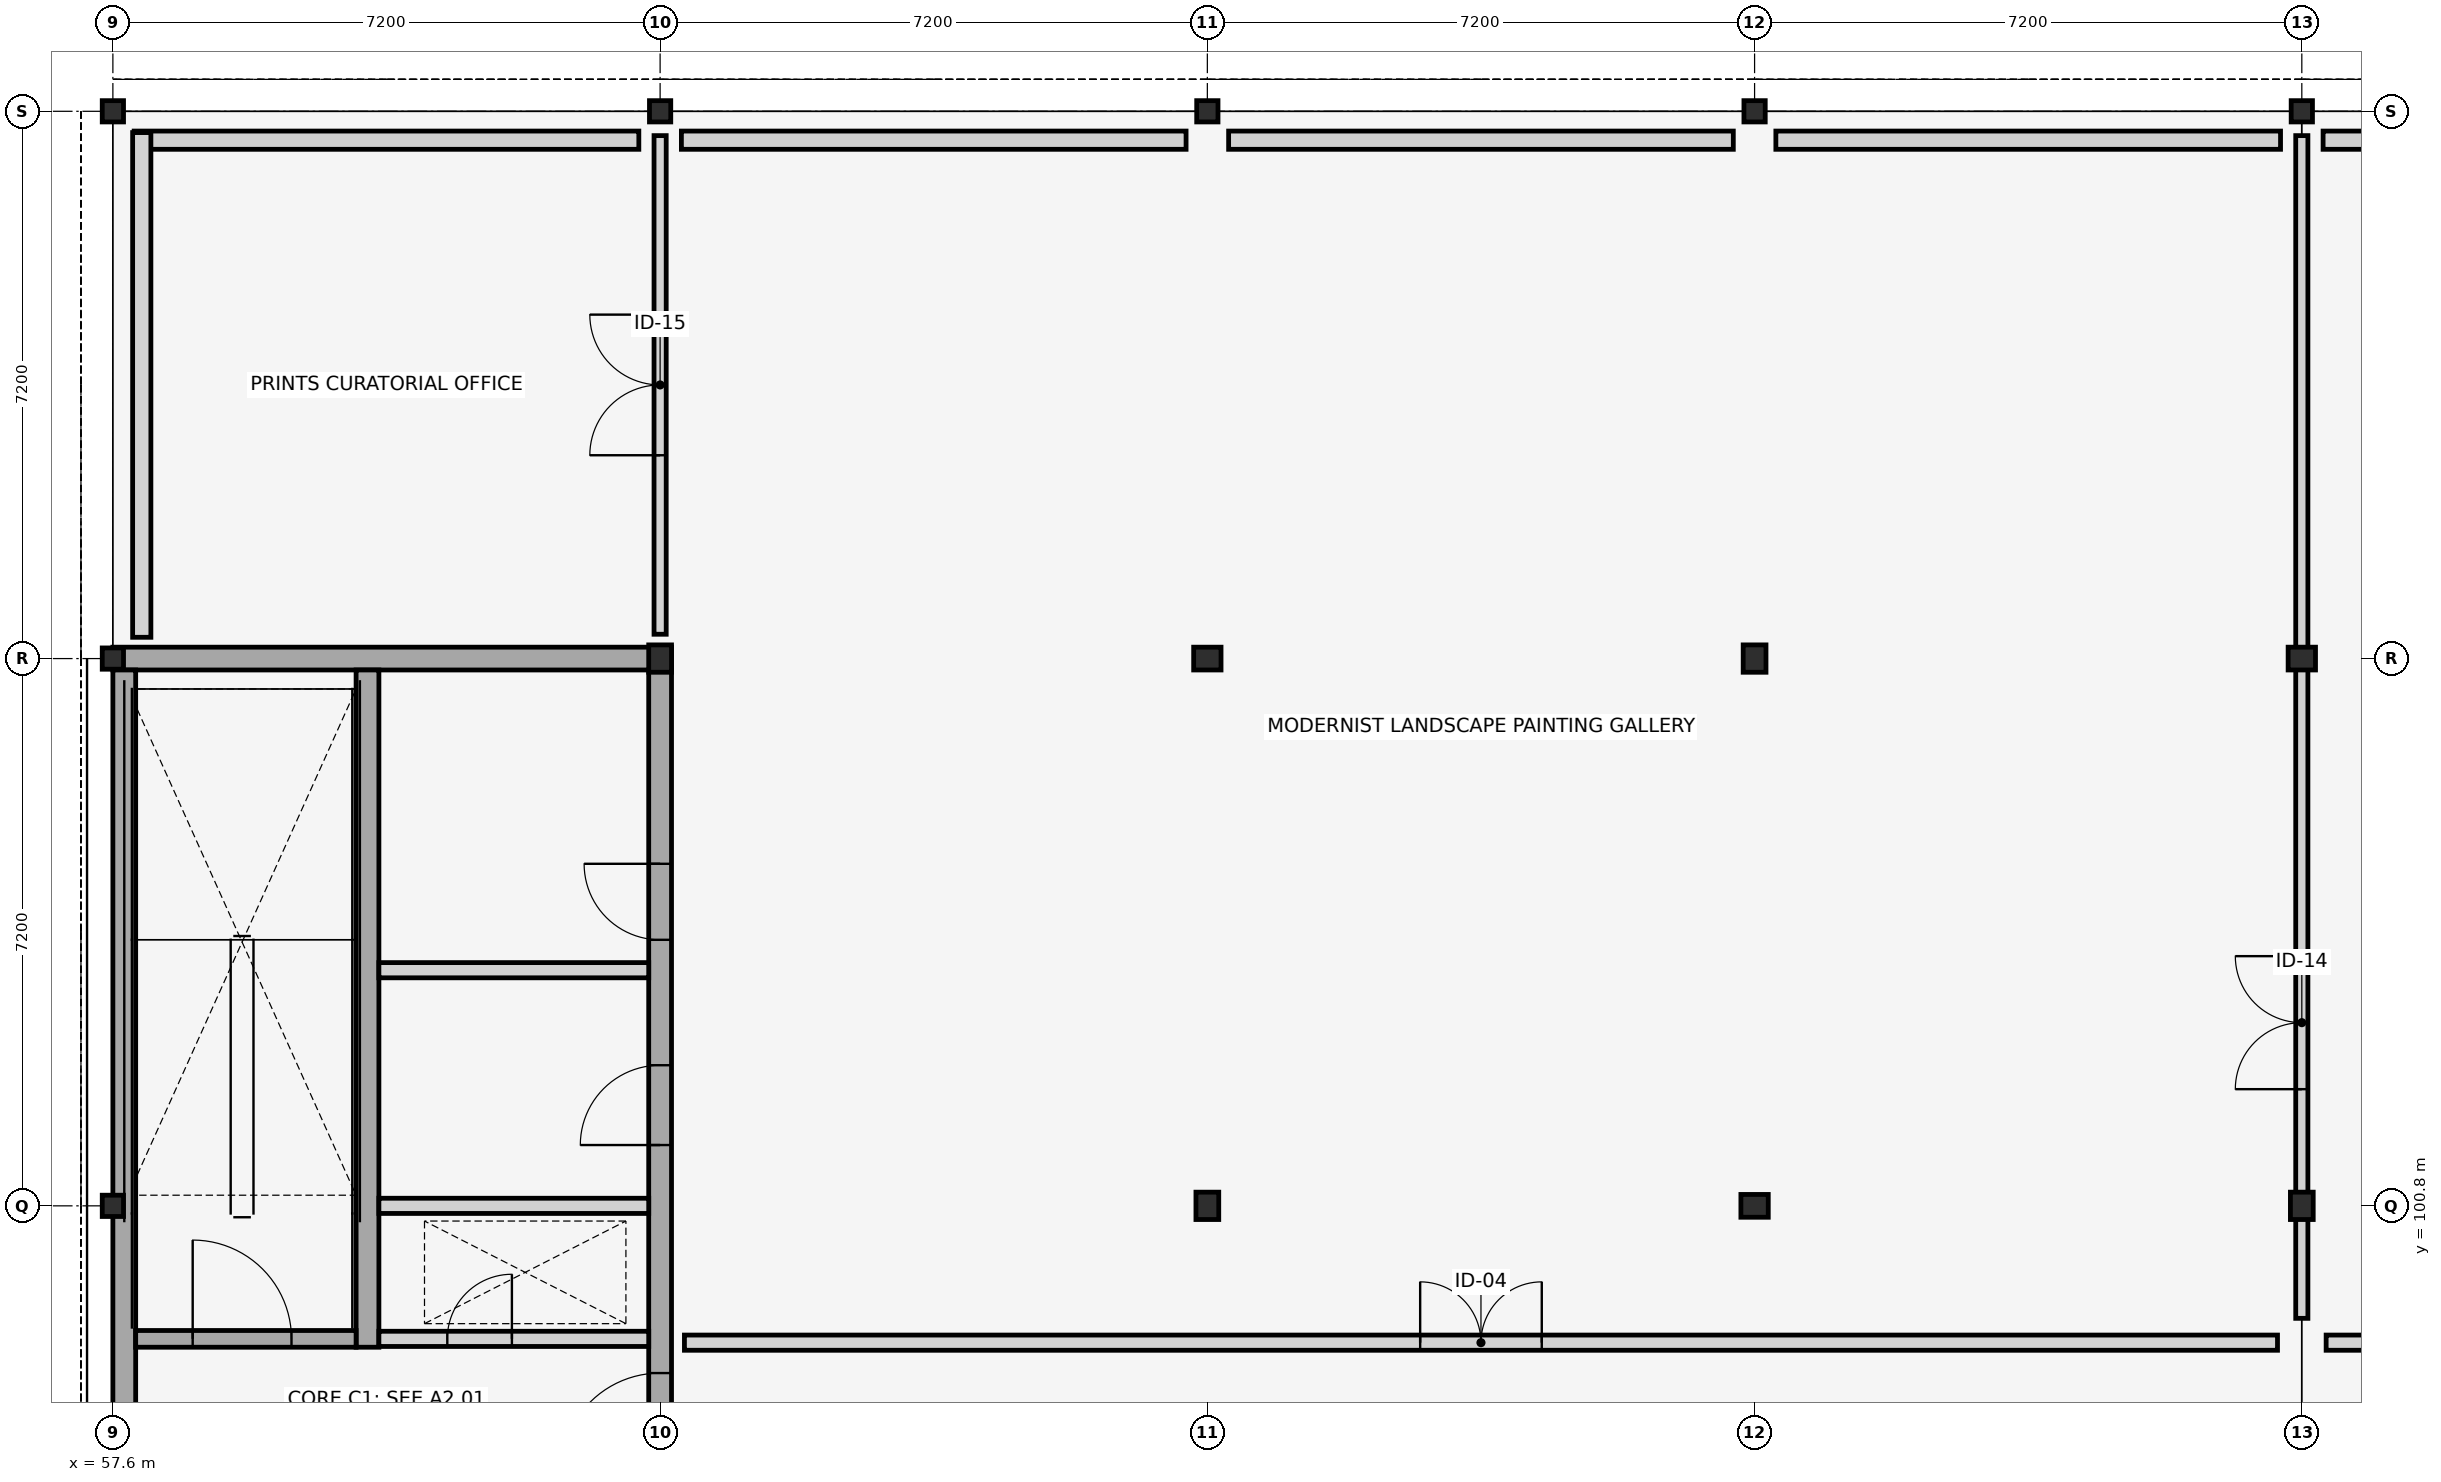
"""IFC4 building model, lengths in metres.
Left out: names, types, materials, properties, quantities, classifications, styles, units other than length and angle.
Written with IfcOpenShell. Run it as: python <this file> out.ifc"""

import sys

from ifc_helpers import new_model, si_unit, direction, frame, frame_2d, origin, origin_2d, place, context, subcontext, project, spatial, rectangle, i_section, extrude, element, fill, save


model = new_model("IFC4")
c1 = context("Model", 3, precision=1e-05, world=origin(), true_north=direction((0.0, 1.0)))
c2 = subcontext(c1, "Body", "Model", "MODEL_VIEW")
j1 = project(units=[si_unit("LENGTHUNIT", "METRE"), si_unit("PLANEANGLEUNIT", "RADIAN")], contexts=[c1])
p1 = place(None, origin())
s1 = spatial("IfcSite", under=j1, at=p1, CompositionType="ELEMENT")
p2 = place(p1, origin())
s2 = spatial("IfcBuilding", under=s1, at=p2, CompositionType="ELEMENT")
p3 = place(p2, frame((0.0, 0.0, 12.9)))
s3 = spatial("IfcBuildingStorey", under=s2, at=p3, CompositionType="ELEMENT", Elevation=12.9)
for number, where, z_axis, x_axis in (
    (1, (57.6, 100.8, 0.0), (0.0, 0.0, 1.0), (1.0, 0.0, 0.0)),
    (2, (57.6, 108.0, 0.0), (0.0, 0.0, 1.0), (0.0, 1.0, 0.0)),
    (3, (57.6, 115.2, 0.0), (0.0, 0.0, 1.0), (1.0, 0.0, 0.0)),
):
    element("IfcColumn", number, at=place(p3, frame(where, z_axis=z_axis, x_axis=x_axis)), inside=s3, PredefinedType="COLUMN", context=c2, shape_type="SweptSolid", body=[
        extrude(i_section(OverallWidth=0.28, OverallDepth=0.28, WebThickness=0.01, FlangeThickness=0.018, FilletRadius=0.024, at=origin_2d()), origin(), (0.0, 0.0, 1.0), 4.2),
    ])
p4 = place(p3, frame((64.8, 108.0, 0.0), z_axis=(0.0, 0.0, 1.0), x_axis=(1.0, 0.0, 0.0)))
e4 = element("IfcColumn", 4, at=p4, inside=s3, PredefinedType="COLUMN", context=c2, shape_type="SweptSolid", body=[
    extrude(i_section(OverallWidth=0.3, OverallDepth=0.36, WebThickness=0.012, FlangeThickness=0.022, FilletRadius=0.027, at=origin_2d()), origin(), (0.0, 0.0, 1.0), 4.2),
])
p5 = place(p3, frame((64.8, 115.2, 0.0), z_axis=(0.0, 0.0, 1.0), x_axis=(0.0, 1.0, 0.0)))
e5 = element("IfcColumn", 5, at=p5, inside=s3, PredefinedType="COLUMN", context=c2, shape_type="SweptSolid", body=[
    extrude(i_section(OverallWidth=0.28, OverallDepth=0.28, WebThickness=0.01, FlangeThickness=0.018, FilletRadius=0.024, at=origin_2d()), origin(), (0.0, 0.0, 1.0), 4.2),
])
for number, where, z_axis, x_axis in (
    (6, (72.0, 100.8, 0.0), (0.0, 0.0, 1.0), (1.0, 0.0, 0.0)),
    (7, (72.0, 108.0, 0.0), (0.0, 0.0, 1.0), (0.0, 1.0, 0.0)),
):
    element("IfcColumn", number, at=place(p3, frame(where, z_axis=z_axis, x_axis=x_axis)), inside=s3, PredefinedType="COLUMN", context=c2, shape_type="SweptSolid", body=[
        extrude(i_section(OverallWidth=0.3, OverallDepth=0.36, WebThickness=0.012, FlangeThickness=0.022, FilletRadius=0.027, at=origin_2d()), origin(), (0.0, 0.0, 1.0), 4.2),
    ])
p6 = place(p3, frame((72.0, 115.2, 0.0), z_axis=(0.0, 0.0, 1.0), x_axis=(1.0, 0.0, 0.0)))
e8 = element("IfcColumn", 8, at=p6, inside=s3, PredefinedType="COLUMN", context=c2, shape_type="SweptSolid", body=[
    extrude(i_section(OverallWidth=0.28, OverallDepth=0.28, WebThickness=0.01, FlangeThickness=0.018, FilletRadius=0.024, at=origin_2d()), origin(), (0.0, 0.0, 1.0), 4.2),
])
for number, where, z_axis, x_axis in (
    (9, (79.2, 100.8, 0.0), (0.0, 0.0, 1.0), (0.0, 1.0, 0.0)),
    (10, (79.2, 108.0, 0.0), (0.0, 0.0, 1.0), (1.0, 0.0, 0.0)),
):
    element("IfcColumn", number, at=place(p3, frame(where, z_axis=z_axis, x_axis=x_axis)), inside=s3, PredefinedType="COLUMN", context=c2, shape_type="SweptSolid", body=[
        extrude(i_section(OverallWidth=0.3, OverallDepth=0.36, WebThickness=0.012, FlangeThickness=0.022, FilletRadius=0.027, at=origin_2d()), origin(), (0.0, 0.0, 1.0), 4.2),
    ])
p7 = place(p3, frame((79.2, 115.2, 0.0), z_axis=(0.0, 0.0, 1.0), x_axis=(0.0, 1.0, 0.0)))
e11 = element("IfcColumn", 11, at=p7, inside=s3, PredefinedType="COLUMN", context=c2, shape_type="SweptSolid", body=[
    extrude(i_section(OverallWidth=0.28, OverallDepth=0.28, WebThickness=0.01, FlangeThickness=0.018, FilletRadius=0.024, at=origin_2d()), origin(), (0.0, 0.0, 1.0), 4.2),
])
for number, where, z_axis, x_axis in (
    (12, (86.4, 100.8, 0.0), (0.0, 0.0, 1.0), (1.0, 0.0, 0.0)),
    (13, (86.4, 108.0, 0.0), (0.0, 0.0, 1.0), (0.0, 1.0, 0.0)),
):
    element("IfcColumn", number, at=place(p3, frame(where, z_axis=z_axis, x_axis=x_axis)), inside=s3, PredefinedType="COLUMN", context=c2, shape_type="SweptSolid", body=[
        extrude(i_section(OverallWidth=0.3, OverallDepth=0.36, WebThickness=0.012, FlangeThickness=0.022, FilletRadius=0.027, at=origin_2d()), origin(), (0.0, 0.0, 1.0), 4.2),
    ])
p8 = place(p3, frame((86.4, 115.2, 0.0), z_axis=(0.0, 0.0, 1.0), x_axis=(1.0, 0.0, 0.0)))
e14 = element("IfcColumn", 14, at=p8, inside=s3, PredefinedType="COLUMN", context=c2, shape_type="SweptSolid", body=[
    extrude(i_section(OverallWidth=0.28, OverallDepth=0.28, WebThickness=0.01, FlangeThickness=0.018, FilletRadius=0.024, at=origin_2d()), origin(), (0.0, 0.0, 1.0), 4.2),
])
for number, where, z_axis, x_axis in (
    (15, (93.32, 114.82, 0.0), (0.0, 0.0, 1.0), (-1.0, 0.0, 0.0)),
    (16, (86.12, 114.82, 0.0), (0.0, 0.0, 1.0), (-1.0, 0.0, 0.0)),
):
    element("IfcWall", number, at=place(p3, frame(where, z_axis=z_axis, x_axis=x_axis)), inside=s3, PredefinedType="STANDARD", context=c2, shape_type="SweptSolid", body=[
        extrude(rectangle(XDim=6.64, YDim=0.24, at=frame_2d((3.32, 0.0))), origin(), (0.0, 0.0, 1.0), 3.56),
    ])
for number, where, z_axis, x_axis in (
    (17, (78.92, 114.82, 0.0), (0.0, 0.0, 1.0), (-1.0, 0.0, 0.0)),
    (18, (71.72, 114.82, 0.0), (0.0, 0.0, 1.0), (-1.0, 0.0, 0.0)),
):
    element("IfcWall", number, at=place(p3, frame(where, z_axis=z_axis, x_axis=x_axis)), inside=s3, PredefinedType="STANDARD", context=c2, shape_type="SweptSolid", body=[
        extrude(rectangle(XDim=6.64, YDim=0.24, at=frame_2d((3.32, 0.0))), origin(), (0.0, 0.0, 1.0), 3.56),
    ])
p9 = place(p3, frame((64.52, 114.82, 0.0), z_axis=(0.0, 0.0, 1.0), x_axis=(-1.0, 0.0, 0.0)))
e19 = element("IfcWall", 19, at=p9, inside=s3, PredefinedType="STANDARD", context=c2, shape_type="SweptSolid", body=[
    extrude(rectangle(XDim=6.64, YDim=0.24, at=frame_2d((3.32, 0.0))), origin(), (0.0, 0.0, 1.0), 3.56),
])
p10 = place(p3, frame((57.98, 114.92, 0.0), z_axis=(0.0, 0.0, 1.0), x_axis=(0.0, -1.0, 0.0)))
e20 = element("IfcWall", 20, at=p10, inside=s3, PredefinedType="STANDARD", context=c2, shape_type="SweptSolid", body=[
    extrude(rectangle(XDim=6.64, YDim=0.24, at=frame_2d((3.32, 0.0))), origin(), (0.0, 0.0, 1.0), 3.56),
])
p11 = place(p3, frame((57.6, 108.0, 0.0), z_axis=(0.0, 0.0, 1.0), x_axis=(1.0, 0.0, 0.0)))
e21 = element("IfcWall", 21, at=p11, inside=s3, PredefinedType="SHEAR", context=c2, shape_type="SweptSolid", body=[
    extrude(rectangle(XDim=7.35, YDim=0.3, at=frame_2d((3.675, 0.0))), origin(), (0.0, 0.0, 1.0), 3.96),
])
p12 = place(p3, frame((57.75, 93.75, 0.0), z_axis=(0.0, 0.0, 1.0), x_axis=(0.0, 1.0, 0.0)))
e22 = element("IfcWall", 22, at=p12, inside=s3, PredefinedType="SHEAR", context=c2, shape_type="SweptSolid", body=[
    extrude(rectangle(XDim=14.1, YDim=0.3, at=frame_2d((7.05, 0.0))), origin(), (0.0, 0.0, 1.0), 3.96),
])
p13 = place(p3, frame((64.8, 93.75, 0.0), z_axis=(0.0, 0.0, 1.0), x_axis=(0.0, 1.0, 0.0)))
e23 = element("IfcWall", 23, at=p13, inside=s3, PredefinedType="SHEAR", context=c2, shape_type="SweptSolid", body=[
    extrude(rectangle(XDim=14.1, YDim=0.3, at=frame_2d((7.05, 0.0))), origin(), (0.0, 0.0, 1.0), 3.96),
])
p14 = place(p13, frame((3.55, 0.0, 0.0)))
e24 = element("IfcOpeningElement", 24, at=p14, cuts=e23, PredefinedType="OPENING", context=c2, shape_type="SweptSolid", body=[
    extrude(rectangle(XDim=1.3, YDim=2.2, at=frame_2d((0.65, 1.1))), frame((0.0, 0.16, 0.0), z_axis=(0.0, -1.0, 0.0), x_axis=(1.0, 0.0, 0.0)), (0.0, 0.0, 1.0), 0.32),
])
p15 = place(p13, frame((7.85, 0.0, 0.0)))
e25 = element("IfcOpeningElement", 25, at=p15, cuts=e23, PredefinedType="OPENING", context=c2, shape_type="SweptSolid", body=[
    extrude(rectangle(XDim=1.05, YDim=2.15, at=frame_2d((0.525, 1.075))), frame((0.0, 0.16, 0.0), z_axis=(0.0, -1.0, 0.0), x_axis=(1.0, 0.0, 0.0)), (0.0, 0.0, 1.0), 0.32),
])
p16 = place(p13, frame((10.55, 0.0, 0.0)))
e26 = element("IfcOpeningElement", 26, at=p16, cuts=e23, PredefinedType="OPENING", context=c2, shape_type="SweptSolid", body=[
    extrude(rectangle(XDim=1.0, YDim=2.15, at=frame_2d((0.5, 1.075))), frame((0.0, 0.16, 0.0), z_axis=(0.0, -1.0, 0.0), x_axis=(1.0, 0.0, 0.0)), (0.0, 0.0, 1.0), 0.32),
])
p17 = place(p3, frame((60.95, 98.94, 0.0), z_axis=(0.0, 0.0, 1.0), x_axis=(0.0, 1.0, 0.0)))
e27 = element("IfcWall", 27, at=p17, inside=s3, PredefinedType="SHEAR", context=c2, shape_type="SweptSolid", body=[
    extrude(rectangle(XDim=8.91, YDim=0.3, at=frame_2d((4.455, 0.0))), origin(), (0.0, 0.0, 1.0), 3.96),
])
p18 = place(p3, frame((61.1, 99.05, 0.0), z_axis=(0.0, 0.0, 1.0), x_axis=(1.0, 0.0, 0.0)))
e28 = element("IfcWall", 28, at=p18, inside=s3, PredefinedType="PLUMBINGWALL", context=c2, shape_type="SweptSolid", body=[
    extrude(rectangle(XDim=3.55, YDim=0.2, at=frame_2d((1.775, 0.0))), origin(), (0.0, 0.0, 1.0), 3.38),
])
p19 = place(p18, frame((0.9, 0.0, 0.0)))
e29 = element("IfcOpeningElement", 29, at=p19, cuts=e28, PredefinedType="OPENING", context=c2, shape_type="SweptSolid", body=[
    extrude(rectangle(XDim=0.85, YDim=2.05, at=frame_2d((0.425, 1.025))), frame((0.0, 0.11, 0.0), z_axis=(0.0, -1.0, 0.0), x_axis=(1.0, 0.0, 0.0)), (0.0, 0.0, 1.0), 0.22),
])
p20 = place(p3, frame((57.9, 99.05, 0.0), z_axis=(0.0, 0.0, 1.0), x_axis=(1.0, 0.0, 0.0)))
e30 = element("IfcWall", 30, at=p20, inside=s3, PredefinedType="SHEAR", context=c2, shape_type="SweptSolid", body=[
    extrude(rectangle(XDim=2.9, YDim=0.22, at=frame_2d((1.45, 0.0))), origin(), (0.0, 0.0, 1.0), 3.96),
])
p21 = place(p20, frame((0.75, 0.0, 0.0)))
e31 = element("IfcOpeningElement", 31, at=p21, cuts=e30, PredefinedType="OPENING", context=c2, shape_type="SweptSolid", body=[
    extrude(rectangle(XDim=1.3, YDim=2.2, at=frame_2d((0.65, 1.1))), frame((0.0, 0.12, 0.0), z_axis=(0.0, -1.0, 0.0), x_axis=(1.0, 0.0, 0.0)), (0.0, 0.0, 1.0), 0.24),
])
for number, where, z_axis, x_axis in (
    (32, (61.1, 100.8, 0.0), (0.0, 0.0, 1.0), (1.0, 0.0, 0.0)),
    (33, (61.1, 103.9, 0.0), (0.0, 0.0, 1.0), (1.0, 0.0, 0.0)),
):
    element("IfcWall", number, at=place(p3, frame(where, z_axis=z_axis, x_axis=x_axis)), inside=s3, PredefinedType="PLUMBINGWALL", context=c2, shape_type="SweptSolid", body=[
        extrude(rectangle(XDim=3.55, YDim=0.2, at=frame_2d((1.775, 0.0))), origin(), (0.0, 0.0, 1.0), 3.38),
    ])
p22 = place(p3, frame((65.12, 99.0, 0.0), z_axis=(0.0, 0.0, 1.0), x_axis=(1.0, 0.0, 0.0)))
e34 = element("IfcWall", 34, at=p22, inside=s3, PredefinedType="PARTITIONING", context=c2, shape_type="SweptSolid", body=[
    extrude(rectangle(XDim=20.96, YDim=0.2, at=frame_2d((10.48, 0.0))), origin(), (0.0, 0.0, 1.0), 3.15),
])
p23 = place(p22, frame((9.68, 0.0, 0.0)))
e35 = element("IfcOpeningElement", 35, at=p23, cuts=e34, PredefinedType="OPENING", context=c2, shape_type="SweptSolid", body=[
    extrude(rectangle(XDim=1.6, YDim=2.35, at=frame_2d((0.8, 1.175))), frame((0.0, 0.11, 0.0), z_axis=(0.0, -1.0, 0.0), x_axis=(1.0, 0.0, 0.0)), (0.0, 0.0, 1.0), 0.22),
])
p24 = place(p3, frame((86.72, 99.0, 0.0), z_axis=(0.0, 0.0, 1.0), x_axis=(1.0, 0.0, 0.0)))
e36 = element("IfcWall", 36, at=p24, inside=s3, PredefinedType="PARTITIONING", context=c2, shape_type="SweptSolid", body=[
    extrude(rectangle(XDim=13.76, YDim=0.2, at=frame_2d((6.88, 0.0))), origin(), (0.0, 0.0, 1.0), 3.15),
])
p25 = place(p24, frame((1.752, 0.0, 0.0)))
e37 = element("IfcOpeningElement", 37, at=p25, cuts=e36, PredefinedType="OPENING", context=c2, shape_type="SweptSolid", body=[
    extrude(rectangle(XDim=1.5, YDim=2.25, at=frame_2d((0.75, 1.125))), frame((0.0, 0.11, 0.0), z_axis=(0.0, -1.0, 0.0), x_axis=(1.0, 0.0, 0.0)), (0.0, 0.0, 1.0), 0.22),
])
p26 = place(p3, frame((86.4, 99.32, 0.0), z_axis=(0.0, 0.0, 1.0), x_axis=(0.0, 1.0, 0.0)))
e38 = element("IfcWall", 38, at=p26, inside=s3, PredefinedType="PARTITIONING", context=c2, shape_type="SweptSolid", body=[
    extrude(rectangle(XDim=15.56, YDim=0.16, at=frame_2d((7.78, 0.0))), origin(), (0.0, 0.0, 1.0), 3.15),
])
p27 = place(p26, frame((3.015, 0.0, 0.0)))
e39 = element("IfcOpeningElement", 39, at=p27, cuts=e38, PredefinedType="OPENING", context=c2, shape_type="SweptSolid", body=[
    extrude(rectangle(XDim=1.75, YDim=2.45, at=frame_2d((0.875, 1.225))), frame((0.0, 0.09, 0.0), z_axis=(0.0, -1.0, 0.0), x_axis=(1.0, 0.0, 0.0)), (0.0, 0.0, 1.0), 0.18),
])
p28 = place(p3, frame((64.8, 108.32, 0.0), z_axis=(0.0, 0.0, 1.0), x_axis=(0.0, 1.0, 0.0)))
e40 = element("IfcWall", 40, at=p28, inside=s3, PredefinedType="PARTITIONING", context=c2, shape_type="SweptSolid", body=[
    extrude(rectangle(XDim=6.56, YDim=0.16, at=frame_2d((3.28, 0.0))), origin(), (0.0, 0.0, 1.0), 3.15),
])
p29 = place(p28, frame((2.355, 0.0, 0.0)))
e41 = element("IfcOpeningElement", 41, at=p29, cuts=e40, PredefinedType="OPENING", context=c2, shape_type="SweptSolid", body=[
    extrude(rectangle(XDim=1.85, YDim=2.5, at=frame_2d((0.925, 1.25))), frame((0.0, 0.09, 0.0), z_axis=(0.0, -1.0, 0.0), x_axis=(1.0, 0.0, 0.0)), (0.0, 0.0, 1.0), 0.18),
])
p30 = place(p14, origin())
e42 = element("IfcDoor", 42, at=p30, inside=s3, OperationType="SINGLE_SWING_LEFT", PredefinedType="DOOR", context=c2, shape_type="SweptSolid", body=[
    extrude(rectangle(XDim=1.3, YDim=2.2, at=frame_2d((0.65, 1.1))), frame((0.0, 0.025, 0.0), z_axis=(0.0, -1.0, 0.0), x_axis=(1.0, 0.0, 0.0)), (0.0, 0.0, 1.0), 0.05),
])
fill(e24, e42)
p31 = place(p15, origin())
e43 = element("IfcDoor", 43, at=p31, inside=s3, OperationType="SINGLE_SWING_LEFT", PredefinedType="DOOR", context=c2, shape_type="SweptSolid", body=[
    extrude(rectangle(XDim=1.05, YDim=2.15, at=frame_2d((0.525, 1.075))), frame((0.0, 0.025, 0.0), z_axis=(0.0, -1.0, 0.0), x_axis=(1.0, 0.0, 0.0)), (0.0, 0.0, 1.0), 0.05),
])
fill(e25, e43)
p32 = place(p16, origin())
e44 = element("IfcDoor", 44, at=p32, inside=s3, OperationType="SINGLE_SWING_RIGHT", PredefinedType="DOOR", context=c2, shape_type="SweptSolid", body=[
    extrude(rectangle(XDim=1.0, YDim=2.15, at=frame_2d((0.5, 1.075))), frame((0.0, 0.025, 0.0), z_axis=(0.0, -1.0, 0.0), x_axis=(1.0, 0.0, 0.0)), (0.0, 0.0, 1.0), 0.05),
])
fill(e26, e44)
p33 = place(p19, origin())
e45 = element("IfcDoor", 45, at=p33, inside=s3, OperationType="SINGLE_SWING_RIGHT", PredefinedType="TRAPDOOR", context=c2, shape_type="SweptSolid", body=[
    extrude(rectangle(XDim=0.85, YDim=2.05, at=frame_2d((0.425, 1.025))), frame((0.0, 0.025, 0.0), z_axis=(0.0, -1.0, 0.0), x_axis=(1.0, 0.0, 0.0)), (0.0, 0.0, 1.0), 0.05),
])
fill(e29, e45)
p34 = place(p21, origin())
e46 = element("IfcDoor", 46, at=p34, inside=s3, OperationType="SINGLE_SWING_LEFT", PredefinedType="DOOR", context=c2, shape_type="SweptSolid", body=[
    extrude(rectangle(XDim=1.3, YDim=2.2, at=frame_2d((0.65, 1.1))), frame((0.0, 0.025, 0.0), z_axis=(0.0, -1.0, 0.0), x_axis=(1.0, 0.0, 0.0)), (0.0, 0.0, 1.0), 0.05),
])
fill(e31, e46)
p35 = place(p23, origin())
e47 = element("IfcDoor", 47, at=p35, inside=s3, OperationType="DOUBLE_DOOR_SINGLE_SWING", PredefinedType="DOOR", context=c2, shape_type="SweptSolid", body=[
    extrude(rectangle(XDim=1.6, YDim=2.35, at=frame_2d((0.8, 1.175))), frame((0.0, 0.025, 0.0), z_axis=(0.0, -1.0, 0.0), x_axis=(1.0, 0.0, 0.0)), (0.0, 0.0, 1.0), 0.05),
])
fill(e35, e47)
p36 = place(p27, origin())
e48 = element("IfcDoor", 48, at=p36, inside=s3, OperationType="DOUBLE_DOOR_SINGLE_SWING", PredefinedType="DOOR", context=c2, shape_type="SweptSolid", body=[
    extrude(rectangle(XDim=1.75, YDim=2.45, at=frame_2d((0.875, 1.225))), frame((0.0, 0.025, 0.0), z_axis=(0.0, -1.0, 0.0), x_axis=(1.0, 0.0, 0.0)), (0.0, 0.0, 1.0), 0.05),
])
fill(e39, e48)
p37 = place(p29, origin())
e49 = element("IfcDoor", 49, at=p37, inside=s3, OperationType="DOUBLE_DOOR_SINGLE_SWING", PredefinedType="DOOR", context=c2, shape_type="SweptSolid", body=[
    extrude(rectangle(XDim=1.85, YDim=2.5, at=frame_2d((0.925, 1.25))), frame((0.0, 0.025, 0.0), z_axis=(0.0, -1.0, 0.0), x_axis=(1.0, 0.0, 0.0)), (0.0, 0.0, 1.0), 0.05),
])
fill(e41, e49)
save(model, sys.argv[1])
